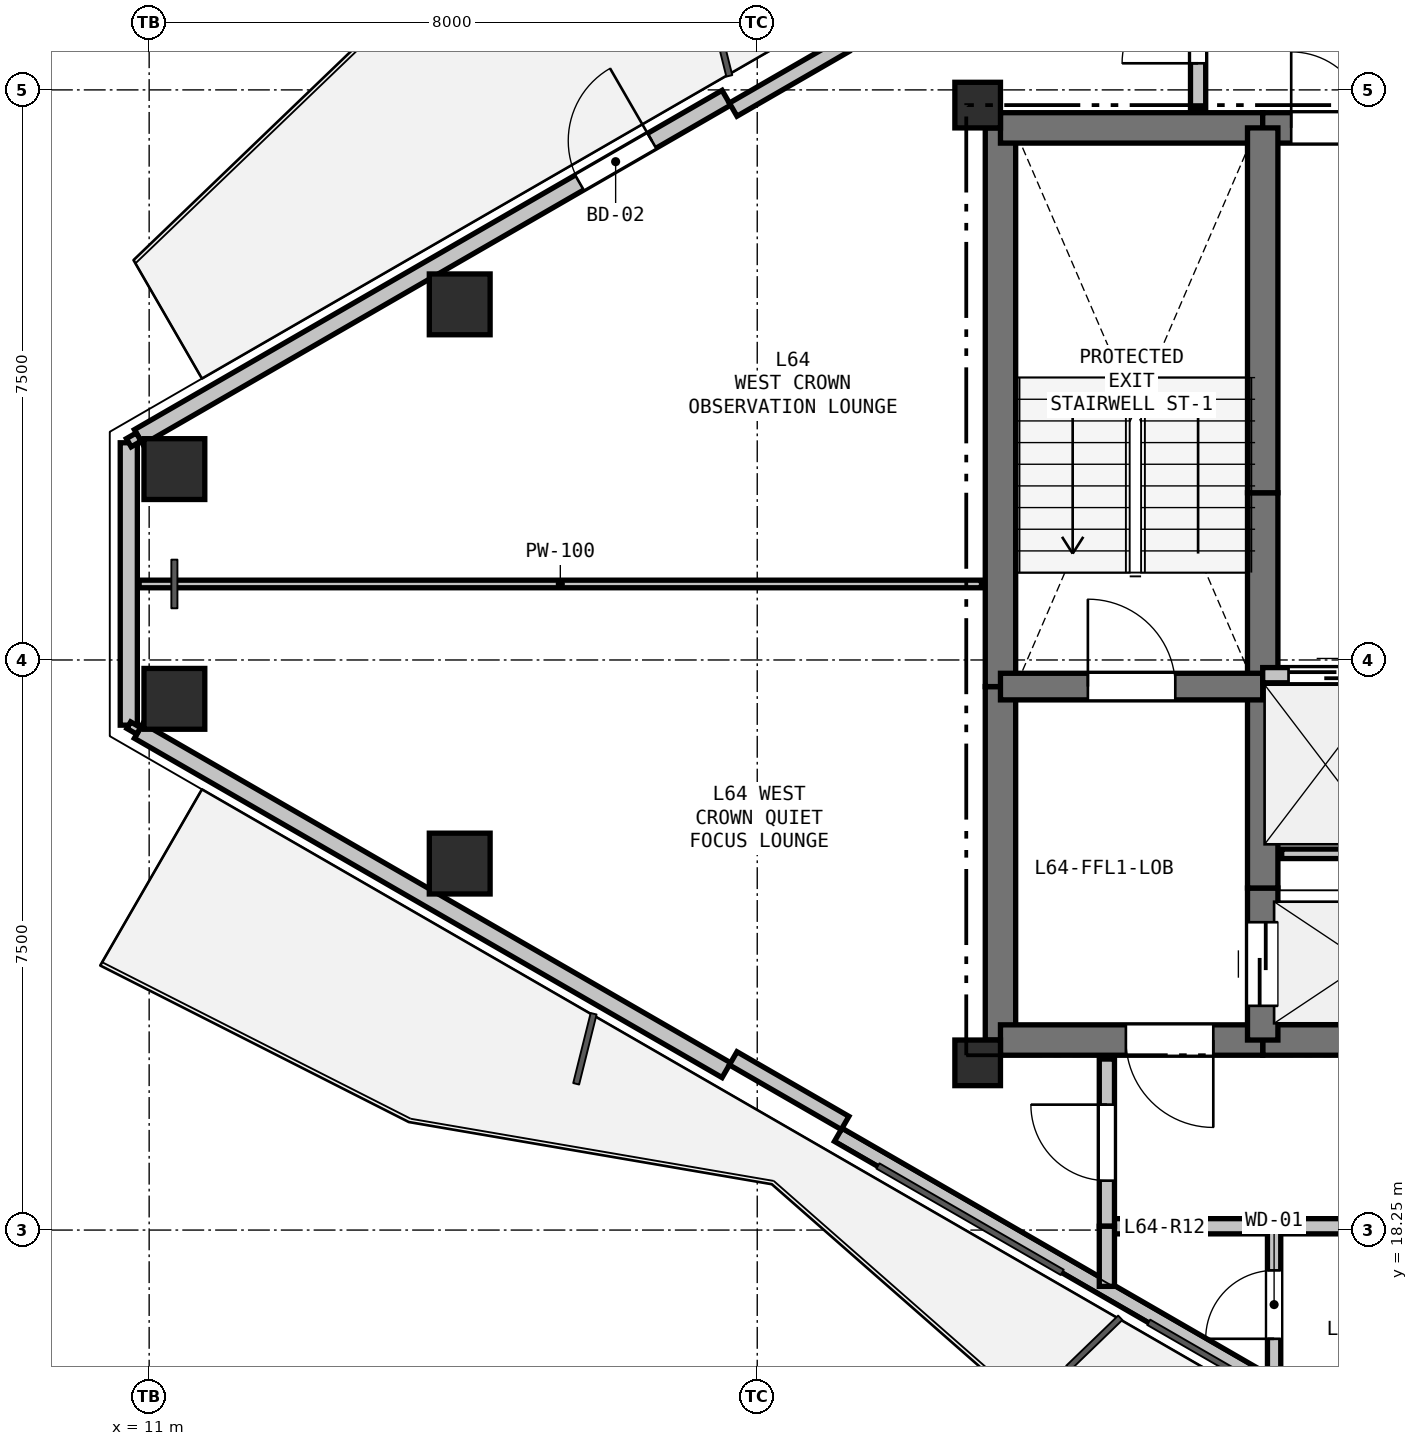
"""IFC4 building model, lengths in metres.
Left out: names, types, materials, properties, quantities, classifications, styles, units other than length and angle.
Written with IfcOpenShell. Run it as: python <this file> out.ifc"""

import sys

from ifc_helpers import new_model, si_unit, direction, frame, frame_2d, origin, origin_2d, place, context, subcontext, project, spatial, rectangle, hollow_rectangle, extrude, element, fill, save


model = new_model("IFC4")
c1 = context("Model", 3, precision=1e-05, world=origin(), true_north=direction((0.0, 1.0)))
c2 = subcontext(c1, "Body", "Model", "MODEL_VIEW")
j1 = project(units=[si_unit("LENGTHUNIT", "METRE"), si_unit("PLANEANGLEUNIT", "RADIAN")], contexts=[c1])
p1 = place(None, origin())
s1 = spatial("IfcSite", under=j1, at=p1, CompositionType="ELEMENT")
p2 = place(p1, origin())
s2 = spatial("IfcBuilding", under=s1, at=p2, CompositionType="ELEMENT")
p3 = place(p2, frame((0.0, 0.0, 229.8)))
s3 = spatial("IfcBuildingStorey", under=s2, at=p3, CompositionType="ELEMENT", Elevation=229.8)
for number, where, z_axis, x_axis in (
    (1, (21.9, 20.45, 0.0), (0.0, 0.0, 1.0), (1.0, 0.0, 0.0)),
    (2, (21.9, 33.05, 0.0), (0.0, 0.0, 1.0), (1.0, 0.0, 0.0)),
):
    element("IfcColumn", number, at=place(p3, frame(where, z_axis=z_axis, x_axis=x_axis)), inside=s3, PredefinedType="COLUMN", context=c2, shape_type="SweptSolid", body=[
        extrude(rectangle(XDim=0.6, YDim=0.6, at=origin_2d()), origin(), (0.0, 0.0, 1.0), 3.3),
    ])
for number, where, z_axis, x_axis in (
    (3, (11.332, 28.261, 0.0), (0.0, 0.0, 1.0), (1.0, 0.0, 0.0)),
    (4, (15.086, 30.428, 0.0), (0.0, 0.0, 1.0), (1.0, 0.0, 0.0)),
    (5, (15.086, 23.072, 0.0), (0.0, 0.0, 1.0), (1.0, 0.0, 0.0)),
    (6, (11.332, 25.239, 0.0), (0.0, 0.0, 1.0), (1.0, 0.0, 0.0)),
):
    element("IfcColumn", number, at=place(p3, frame(where, z_axis=z_axis, x_axis=x_axis)), inside=s3, PredefinedType="COLUMN", context=c2, shape_type="SweptSolid", body=[
        extrude(hollow_rectangle(XDim=0.8, YDim=0.8, WallThickness=0.025, at=origin_2d()), origin(), (0.0, 0.0, 1.0), 3.3),
    ])
p4 = place(p3, frame((10.732, 24.892, 0.0), z_axis=(0.0, 0.0, 1.0), x_axis=(0.0, 1.0, 0.0)))
e7 = element("IfcWall", 7, at=p4, inside=s3, PredefinedType="SOLIDWALL", context=c2, shape_type="SweptSolid", body=[
    extrude(rectangle(XDim=3.715, YDim=0.225, at=frame_2d((1.858, 0.0))), origin(), (0.0, 0.0, 1.0), 2.7),
])
p5 = place(p3, frame((10.862, 28.683, 0.0), z_axis=(0.0, 0.0, 1.0), x_axis=(0.866026655105, 0.499997832642, 0.0)))
e8 = element("IfcWall", 8, at=p5, inside=s3, PredefinedType="SOLIDWALL", context=c2, shape_type="SweptSolid", body=[
    extrude(rectangle(XDim=8.928, YDim=0.225, at=frame_2d((4.464, 0.0))), origin(), (0.0, 0.0, 1.0), 2.7),
])
p6 = place(p5, frame((6.696, 0.0, 0.0)))
e9 = element("IfcOpeningElement", 9, at=p6, cuts=e8, PredefinedType="OPENING", context=c2, shape_type="SweptSolid", body=[
    extrude(rectangle(XDim=1.1, YDim=2.1, at=frame_2d((0.55, 1.05))), frame((0.0, 0.123, 0.0), z_axis=(0.0, -1.0, 0.0), x_axis=(1.0, 0.0, 0.0)), (0.0, 0.0, 1.0), 0.245),
])
p7 = place(p3, frame((18.684, 32.991, 0.0), z_axis=(0.0, 0.0, 1.0), x_axis=(0.866025371046, 0.500000056704, 0.0)))
e10 = element("IfcWall", 10, at=p7, inside=s3, PredefinedType="PARAPET", context=c2, shape_type="SweptSolid", body=[
    extrude(rectangle(XDim=1.7, YDim=0.2, at=frame_2d((0.85, 0.0))), origin(), (0.0, 0.0, 1.0), 2.7),
])
p8 = place(p3, frame((27.191, 15.389, 0.0), z_axis=(0.0, 0.0, 1.0), x_axis=(-0.866019557082, 0.500010126649, 0.0)))
e11 = element("IfcWall", 11, at=p8, inside=s3, PredefinedType="PARAPET", context=c2, shape_type="SweptSolid", body=[
    extrude(rectangle(XDim=8.228, YDim=0.2, at=frame_2d((4.114, 0.0))), origin(), (0.0, 0.0, 1.0), 0.2),
])
p9 = place(p3, frame((18.594, 20.354, 0.0), z_axis=(0.0, 0.0, 1.0), x_axis=(-0.866026655105, 0.499997832642, 0.0)))
e12 = element("IfcWall", 12, at=p9, inside=s3, PredefinedType="SOLIDWALL", context=c2, shape_type="SweptSolid", body=[
    extrude(rectangle(XDim=8.928, YDim=0.225, at=frame_2d((4.464, 0.0))), origin(), (0.0, 0.0, 1.0), 2.7),
])
p10 = place(p3, frame((20.156, 19.659, 0.0), z_axis=(0.0, 0.0, 1.0), x_axis=(-0.866025371046, 0.500000056704, 0.0)))
e13 = element("IfcWall", 13, at=p10, inside=s3, PredefinedType="PARAPET", context=c2, shape_type="SweptSolid", body=[
    extrude(rectangle(XDim=1.7, YDim=0.2, at=frame_2d((0.85, 0.0))), origin(), (0.0, 0.0, 1.0), 2.7),
])
p11 = place(p3, frame((22.2, 20.75, 0.0), z_axis=(0.0, 0.0, 1.0), x_axis=(0.0, 1.0, 0.0)))
e14 = element("IfcWall", 14, at=p11, inside=s3, PredefinedType="SHEAR", context=c2, shape_type="SweptSolid", body=[
    extrude(rectangle(XDim=4.65, YDim=0.4, at=frame_2d((2.325, 0.0))), origin(), (0.0, 0.0, 1.0), 3.08),
])
p12 = place(p3, frame((22.2, 25.4, 0.0), z_axis=(0.0, 0.0, 1.0), x_axis=(0.0, 1.0, 0.0)))
e15 = element("IfcWall", 15, at=p12, inside=s3, PredefinedType="SHEAR", context=c2, shape_type="SweptSolid", body=[
    extrude(rectangle(XDim=7.35, YDim=0.4, at=frame_2d((3.675, 0.0))), origin(), (0.0, 0.0, 1.0), 3.08),
])
p13 = place(p3, frame((22.2, 32.75, 0.0), z_axis=(0.0, 0.0, 1.0), x_axis=(1.0, 0.0, 0.0)))
e16 = element("IfcWall", 16, at=p13, inside=s3, PredefinedType="SHEAR", context=c2, shape_type="SweptSolid", body=[
    extrude(rectangle(XDim=3.45, YDim=0.4, at=frame_2d((1.725, 0.0))), origin(), (0.0, 0.0, 1.0), 3.08),
])
p14 = place(p3, frame((25.65, 32.75, 0.0), z_axis=(0.0, 0.0, 1.0), x_axis=(1.0, 0.0, 0.0)))
e17 = element("IfcWall", 17, at=p14, inside=s3, PredefinedType="SHEAR", context=c2, shape_type="SweptSolid", body=[
    extrude(rectangle(XDim=1.75, YDim=0.4, at=frame_2d((0.875, 0.0))), origin(), (0.0, 0.0, 1.0), 3.08),
])
p15 = place(p14, frame((0.375, 0.0, 0.0)))
e18 = element("IfcOpeningElement", 18, at=p15, cuts=e17, PredefinedType="OPENING", context=c2, shape_type="SweptSolid", body=[
    extrude(rectangle(XDim=1.0, YDim=2.15, at=frame_2d((0.5, 1.075))), frame((0.0, 0.21, 0.0), z_axis=(0.0, -1.0, 0.0), x_axis=(1.0, 0.0, 0.0)), (0.0, 0.0, 1.0), 0.42),
])
p16 = place(p3, frame((28.35, 20.75, 0.0), z_axis=(0.0, 0.0, 1.0), x_axis=(-1.0, 0.0, 0.0)))
e19 = element("IfcWall", 19, at=p16, inside=s3, PredefinedType="SHEAR", context=c2, shape_type="SweptSolid", body=[
    extrude(rectangle(XDim=2.7, YDim=0.4, at=frame_2d((1.35, 0.0))), origin(), (0.0, 0.0, 1.0), 3.08),
])
p17 = place(p3, frame((25.65, 20.75, 0.0), z_axis=(0.0, 0.0, 1.0), x_axis=(-1.0, 0.0, 0.0)))
e20 = element("IfcWall", 20, at=p17, inside=s3, PredefinedType="SHEAR", context=c2, shape_type="SweptSolid", body=[
    extrude(rectangle(XDim=3.45, YDim=0.4, at=frame_2d((1.725, 0.0))), origin(), (0.0, 0.0, 1.0), 3.08),
])
p18 = place(p17, frame((0.65, 0.0, 0.0)))
e21 = element("IfcOpeningElement", 21, at=p18, cuts=e20, PredefinedType="OPENING", context=c2, shape_type="SweptSolid", body=[
    extrude(rectangle(XDim=1.15, YDim=2.15, at=frame_2d((0.575, 1.075))), frame((0.0, 0.21, 0.0), z_axis=(0.0, -1.0, 0.0), x_axis=(1.0, 0.0, 0.0)), (0.0, 0.0, 1.0), 0.42),
])
p19 = place(p3, frame((25.65, 20.75, 0.0), z_axis=(0.0, 0.0, 1.0), x_axis=(0.0, 1.0, 0.0)))
e22 = element("IfcWall", 22, at=p19, inside=s3, PredefinedType="SHEAR", context=c2, shape_type="SweptSolid", body=[
    extrude(rectangle(XDim=2.0, YDim=0.4, at=frame_2d((1.0, 0.0))), origin(), (0.0, 0.0, 1.0), 3.08),
])
p20 = place(p19, frame((0.45, 0.0, 0.0)))
e23 = element("IfcOpeningElement", 23, at=p20, cuts=e22, PredefinedType="OPENING", context=c2, shape_type="SweptSolid", body=[
    extrude(rectangle(XDim=1.1, YDim=2.15, at=frame_2d((0.55, 1.075))), frame((0.0, 0.21, 0.0), z_axis=(0.0, -1.0, 0.0), x_axis=(1.0, 0.0, 0.0)), (0.0, 0.0, 1.0), 0.42),
])
p21 = place(p3, frame((25.65, 22.75, 0.0), z_axis=(0.0, 0.0, 1.0), x_axis=(0.0, 1.0, 0.0)))
e24 = element("IfcWall", 24, at=p21, inside=s3, PredefinedType="SHEAR", context=c2, shape_type="SweptSolid", body=[
    extrude(rectangle(XDim=2.8, YDim=0.4, at=frame_2d((1.4, 0.0))), origin(), (0.0, 0.0, 1.0), 3.08),
])
p22 = place(p3, frame((25.65, 25.55, 0.0), z_axis=(0.0, 0.0, 1.0), x_axis=(0.0, 1.0, 0.0)))
e25 = element("IfcWall", 25, at=p22, inside=s3, PredefinedType="SHEAR", context=c2, shape_type="SweptSolid", body=[
    extrude(rectangle(XDim=2.4, YDim=0.4, at=frame_2d((1.2, 0.0))), origin(), (0.0, 0.0, 1.0), 3.08),
])
p23 = place(p3, frame((25.65, 27.95, 0.0), z_axis=(0.0, 0.0, 1.0), x_axis=(0.0, 1.0, 0.0)))
e26 = element("IfcWall", 26, at=p23, inside=s3, PredefinedType="SHEAR", context=c2, shape_type="SweptSolid", body=[
    extrude(rectangle(XDim=4.8, YDim=0.4, at=frame_2d((2.4, 0.0))), origin(), (0.0, 0.0, 1.0), 3.08),
])
p24 = place(p3, frame((22.2, 25.4, 0.0), z_axis=(0.0, 0.0, 1.0), x_axis=(1.0, 0.0, 0.0)))
e27 = element("IfcWall", 27, at=p24, inside=s3, PredefinedType="SHEAR", context=c2, shape_type="SweptSolid", body=[
    extrude(rectangle(XDim=3.45, YDim=0.35, at=frame_2d((1.725, 0.0))), origin(), (0.0, 0.0, 1.0), 3.08),
])
p25 = place(p24, frame((1.15, 0.0, 0.0)))
e28 = element("IfcOpeningElement", 28, at=p25, cuts=e27, PredefinedType="OPENING", context=c2, shape_type="SweptSolid", body=[
    extrude(rectangle(XDim=1.15, YDim=2.15, at=frame_2d((0.575, 1.075))), frame((0.0, 0.185, 0.0), z_axis=(0.0, -1.0, 0.0), x_axis=(1.0, 0.0, 0.0)), (0.0, 0.0, 1.0), 0.37),
])
p26 = place(p3, frame((25.65, 25.55, 0.0), z_axis=(0.0, 0.0, 1.0), x_axis=(1.0, 0.0, 0.0)))
e29 = element("IfcWall", 29, at=p26, inside=s3, PredefinedType="PARTITIONING", context=c2, shape_type="SweptSolid", body=[
    extrude(rectangle(XDim=4.95, YDim=0.2, at=frame_2d((2.475, 0.0))), origin(), (0.0, 0.0, 1.0), 3.08),
])
p27 = place(p26, frame((0.34, 0.0, 0.0)))
e30 = element("IfcOpeningElement", 30, at=p27, cuts=e29, PredefinedType="OPENING", context=c2, shape_type="SweptSolid", body=[
    extrude(rectangle(XDim=1.1, YDim=2.15, at=frame_2d((0.55, 1.075))), frame((0.0, 0.11, 0.0), z_axis=(0.0, -1.0, 0.0), x_axis=(1.0, 0.0, 0.0)), (0.0, 0.0, 1.0), 0.22),
])
p28 = place(p26, frame((1.99, 0.0, 0.0)))
e31 = element("IfcOpeningElement", 31, at=p28, cuts=e29, PredefinedType="OPENING", context=c2, shape_type="SweptSolid", body=[
    extrude(rectangle(XDim=1.1, YDim=2.15, at=frame_2d((0.55, 1.075))), frame((0.0, 0.11, 0.0), z_axis=(0.0, -1.0, 0.0), x_axis=(1.0, 0.0, 0.0)), (0.0, 0.0, 1.0), 0.22),
])
p29 = place(p26, frame((3.64, 0.0, 0.0)))
e32 = element("IfcOpeningElement", 32, at=p29, cuts=e29, PredefinedType="OPENING", context=c2, shape_type="SweptSolid", body=[
    extrude(rectangle(XDim=1.1, YDim=2.15, at=frame_2d((0.55, 1.075))), frame((0.0, 0.11, 0.0), z_axis=(0.0, -1.0, 0.0), x_axis=(1.0, 0.0, 0.0)), (0.0, 0.0, 1.0), 0.22),
])
p30 = place(p3, frame((25.9, 23.2, 0.0), z_axis=(0.0, 0.0, 1.0), x_axis=(1.0, 0.0, 0.0)))
e33 = element("IfcWall", 33, at=p30, inside=s3, PredefinedType="PARTITIONING", context=c2, shape_type="SweptSolid", body=[
    extrude(rectangle(XDim=1.4, YDim=0.125, at=frame_2d((0.7, 0.0))), origin(), (0.0, 0.0, 1.0), 3.08),
])
p31 = place(p3, frame((24.8, 33.0, 0.0), z_axis=(0.0, 0.0, 1.0), x_axis=(0.0, 1.0, 0.0)))
e34 = element("IfcWall", 34, at=p31, inside=s3, PredefinedType="PARTITIONING", context=c2, shape_type="SweptSolid", body=[
    extrude(rectangle(XDim=2.2, YDim=0.2, at=frame_2d((1.1, 0.0))), origin(), (0.0, 0.0, 1.0), 2.605),
])
p32 = place(p31, frame((0.6, 0.0, 0.0)))
e35 = element("IfcOpeningElement", 35, at=p32, cuts=e34, PredefinedType="OPENING", context=c2, shape_type="SweptSolid", body=[
    extrude(rectangle(XDim=1.0, YDim=2.15, at=frame_2d((0.5, 1.075))), frame((0.0, 0.11, 0.0), z_axis=(0.0, -1.0, 0.0), x_axis=(1.0, 0.0, 0.0)), (0.0, 0.0, 1.0), 0.22),
])
p33 = place(p3, frame((28.8, 18.3, 0.0), z_axis=(0.0, 0.0, 1.0), x_axis=(-1.0, 0.0, 0.0)))
e36 = element("IfcWall", 36, at=p33, inside=s3, PredefinedType="PARTITIONING", context=c2, shape_type="SweptSolid", body=[
    extrude(rectangle(XDim=3.0, YDim=0.2, at=frame_2d((1.5, 0.0))), origin(), (0.0, 0.0, 1.0), 3.08),
])
p34 = place(p33, frame((1.0, 0.0, 0.0)))
e37 = element("IfcOpeningElement", 37, at=p34, cuts=e36, PredefinedType="OPENING", context=c2, shape_type="SweptSolid", body=[
    extrude(rectangle(XDim=1.0, YDim=2.15, at=frame_2d((0.5, 1.075))), frame((0.0, 0.11, 0.0), z_axis=(0.0, -1.0, 0.0), x_axis=(1.0, 0.0, 0.0)), (0.0, 0.0, 1.0), 0.22),
])
p35 = place(p3, frame((25.8, 18.3, 0.0), z_axis=(0.0, 0.0, 1.0), x_axis=(-1.0, 0.0, 0.0)))
e38 = element("IfcWall", 38, at=p35, inside=s3, PredefinedType="PARTITIONING", context=c2, shape_type="SweptSolid", body=[
    extrude(rectangle(XDim=2.2, YDim=0.2, at=frame_2d((1.1, 0.0))), origin(), (0.0, 0.0, 1.0), 2.365),
])
p36 = place(p3, frame((23.6, 18.3, 0.0), z_axis=(0.0, 0.0, 1.0), x_axis=(0.0, 1.0, 0.0)))
e39 = element("IfcWall", 39, at=p36, inside=s3, PredefinedType="PARTITIONING", context=c2, shape_type="SweptSolid", body=[
    extrude(rectangle(XDim=2.2, YDim=0.2, at=frame_2d((1.1, 0.0))), origin(), (0.0, 0.0, 1.0), 2.528),
])
p37 = place(p36, frame((0.6, 0.0, 0.0)))
e40 = element("IfcOpeningElement", 40, at=p37, cuts=e39, PredefinedType="OPENING", context=c2, shape_type="SweptSolid", body=[
    extrude(rectangle(XDim=1.0, YDim=2.15, at=frame_2d((0.5, 1.075))), frame((0.0, 0.11, 0.0), z_axis=(0.0, -1.0, 0.0), x_axis=(1.0, 0.0, 0.0)), (0.0, 0.0, 1.0), 0.22),
])
p38 = place(p3, frame((25.8, 16.239, 0.0), z_axis=(0.0, 0.0, 1.0), x_axis=(0.0, 1.0, 0.0)))
e41 = element("IfcWall", 41, at=p38, inside=s3, PredefinedType="PLUMBINGWALL", context=c2, shape_type="SweptSolid", body=[
    extrude(rectangle(XDim=2.061, YDim=0.175, at=frame_2d((1.031, 0.0))), origin(), (0.0, 0.0, 1.0), 2.365),
])
p39 = place(p38, frame((0.581, 0.0, 0.0)))
e42 = element("IfcOpeningElement", 42, at=p39, cuts=e41, PredefinedType="OPENING", context=c2, shape_type="SweptSolid", body=[
    extrude(rectangle(XDim=0.9, YDim=2.1, at=frame_2d((0.45, 1.05))), frame((0.0, 0.097, 0.0), z_axis=(0.0, -1.0, 0.0), x_axis=(1.0, 0.0, 0.0)), (0.0, 0.0, 1.0), 0.195),
])
p40 = place(p3, frame((23.6, 17.509, 0.0), z_axis=(0.0, 0.0, 1.0), x_axis=(0.0, 1.0, 0.0)))
e43 = element("IfcWall", 43, at=p40, inside=s3, PredefinedType="PARTITIONING", context=c2, shape_type="SweptSolid", body=[
    extrude(rectangle(XDim=0.791, YDim=0.2, at=frame_2d((0.396, 0.0))), origin(), (0.0, 0.0, 1.0), 2.365),
])
p41 = place(p3, frame((21.95, 26.75, 0.0), z_axis=(0.0, 0.0, 1.0), x_axis=(-1.0, 0.0, 0.0)))
e44 = element("IfcWall", 44, at=p41, inside=s3, PredefinedType="PARTITIONING", context=c2, shape_type="SweptSolid", body=[
    extrude(rectangle(XDim=11.082, YDim=0.1, at=frame_2d((5.541, 0.0))), origin(), (0.0, 0.0, 1.0), 2.605),
])
p42 = place(p3, frame((10.732, 28.608, 0.0), z_axis=(0.0, 0.0, 1.0), x_axis=(0.866131372301, 0.499816412211, 0.0)))
e45 = element("IfcWall", 45, at=p42, inside=s3, PredefinedType="PARTITIONING", context=c2, shape_type="SweptSolid", body=[
    extrude(rectangle(XDim=0.15, YDim=0.125, at=frame_2d((0.075, 0.0))), origin(), (0.0, 0.0, 1.0), 3.08),
])
p43 = place(p3, frame((10.862, 24.817, 0.0), z_axis=(0.0, 0.0, 1.0), x_axis=(-0.866131372301, 0.499816412211, 0.0)))
e46 = element("IfcWall", 46, at=p43, inside=s3, PredefinedType="PARTITIONING", context=c2, shape_type="SweptSolid", body=[
    extrude(rectangle(XDim=0.15, YDim=0.1, at=frame_2d((0.075, 0.0))), origin(), (0.0, 0.0, 1.0), 3.08),
])
p44 = place(p6, origin())
e47 = element("IfcDoor", 47, at=p44, inside=s3, OperationType="SINGLE_SWING_RIGHT", PredefinedType="DOOR", context=c2, shape_type="SweptSolid", body=[
    extrude(rectangle(XDim=1.1, YDim=2.1, at=frame_2d((0.55, 1.05))), frame((0.0, 0.025, 0.0), z_axis=(0.0, -1.0, 0.0), x_axis=(1.0, 0.0, 0.0)), (0.0, 0.0, 1.0), 0.05),
])
fill(e9, e47)
p45 = place(p27, origin())
e48 = element("IfcDoor", 48, at=p45, inside=s3, OperationType="SLIDING_TO_LEFT", PredefinedType="DOOR", context=c2, shape_type="SweptSolid", body=[
    extrude(rectangle(XDim=1.1, YDim=2.15, at=frame_2d((0.55, 1.075))), frame((0.0, 0.025, 0.0), z_axis=(0.0, -1.0, 0.0), x_axis=(1.0, 0.0, 0.0)), (0.0, 0.0, 1.0), 0.05),
])
fill(e30, e48)
p46 = place(p15, origin())
e49 = element("IfcDoor", 49, at=p46, inside=s3, OperationType="SINGLE_SWING_LEFT", PredefinedType="DOOR", context=c2, shape_type="SweptSolid", body=[
    extrude(rectangle(XDim=1.0, YDim=2.15, at=frame_2d((0.5, 1.075))), frame((0.0, 0.025, 0.0), z_axis=(0.0, -1.0, 0.0), x_axis=(1.0, 0.0, 0.0)), (0.0, 0.0, 1.0), 0.05),
])
fill(e18, e49)
p47 = place(p20, origin())
e50 = element("IfcDoor", 50, at=p47, inside=s3, OperationType="SLIDING_TO_LEFT", PredefinedType="DOOR", context=c2, shape_type="SweptSolid", body=[
    extrude(rectangle(XDim=1.1, YDim=2.15, at=frame_2d((0.55, 1.075))), frame((0.0, 0.025, 0.0), z_axis=(0.0, -1.0, 0.0), x_axis=(1.0, 0.0, 0.0)), (0.0, 0.0, 1.0), 0.05),
])
fill(e23, e50)
p48 = place(p25, origin())
e51 = element("IfcDoor", 51, at=p48, inside=s3, OperationType="SINGLE_SWING_LEFT", PredefinedType="DOOR", context=c2, shape_type="SweptSolid", body=[
    extrude(rectangle(XDim=1.15, YDim=2.15, at=frame_2d((0.575, 1.075))), frame((0.0, 0.025, 0.0), z_axis=(0.0, -1.0, 0.0), x_axis=(1.0, 0.0, 0.0)), (0.0, 0.0, 1.0), 0.05),
])
fill(e28, e51)
p49 = place(p18, origin())
e52 = element("IfcDoor", 52, at=p49, inside=s3, OperationType="SINGLE_SWING_LEFT", PredefinedType="DOOR", context=c2, shape_type="SweptSolid", body=[
    extrude(rectangle(XDim=1.15, YDim=2.15, at=frame_2d((0.575, 1.075))), frame((0.0, 0.025, 0.0), z_axis=(0.0, -1.0, 0.0), x_axis=(1.0, 0.0, 0.0)), (0.0, 0.0, 1.0), 0.05),
])
fill(e21, e52)
p50 = place(p32, origin())
e53 = element("IfcDoor", 53, at=p50, inside=s3, OperationType="SINGLE_SWING_LEFT", PredefinedType="DOOR", context=c2, shape_type="SweptSolid", body=[
    extrude(rectangle(XDim=1.0, YDim=2.15, at=frame_2d((0.5, 1.075))), frame((0.0, 0.025, 0.0), z_axis=(0.0, -1.0, 0.0), x_axis=(1.0, 0.0, 0.0)), (0.0, 0.0, 1.0), 0.05),
])
fill(e35, e53)
p51 = place(p37, origin())
e54 = element("IfcDoor", 54, at=p51, inside=s3, OperationType="SINGLE_SWING_RIGHT", PredefinedType="DOOR", context=c2, shape_type="SweptSolid", body=[
    extrude(rectangle(XDim=1.0, YDim=2.15, at=frame_2d((0.5, 1.075))), frame((0.0, 0.025, 0.0), z_axis=(0.0, -1.0, 0.0), x_axis=(1.0, 0.0, 0.0)), (0.0, 0.0, 1.0), 0.05),
])
fill(e40, e54)
p52 = place(p39, origin())
e55 = element("IfcDoor", 55, at=p52, inside=s3, OperationType="SINGLE_SWING_LEFT", PredefinedType="DOOR", context=c2, shape_type="SweptSolid", body=[
    extrude(rectangle(XDim=0.9, YDim=2.1, at=frame_2d((0.45, 1.05))), frame((0.0, 0.025, 0.0), z_axis=(0.0, -1.0, 0.0), x_axis=(1.0, 0.0, 0.0)), (0.0, 0.0, 1.0), 0.05),
])
fill(e42, e55)
save(model, sys.argv[1])
